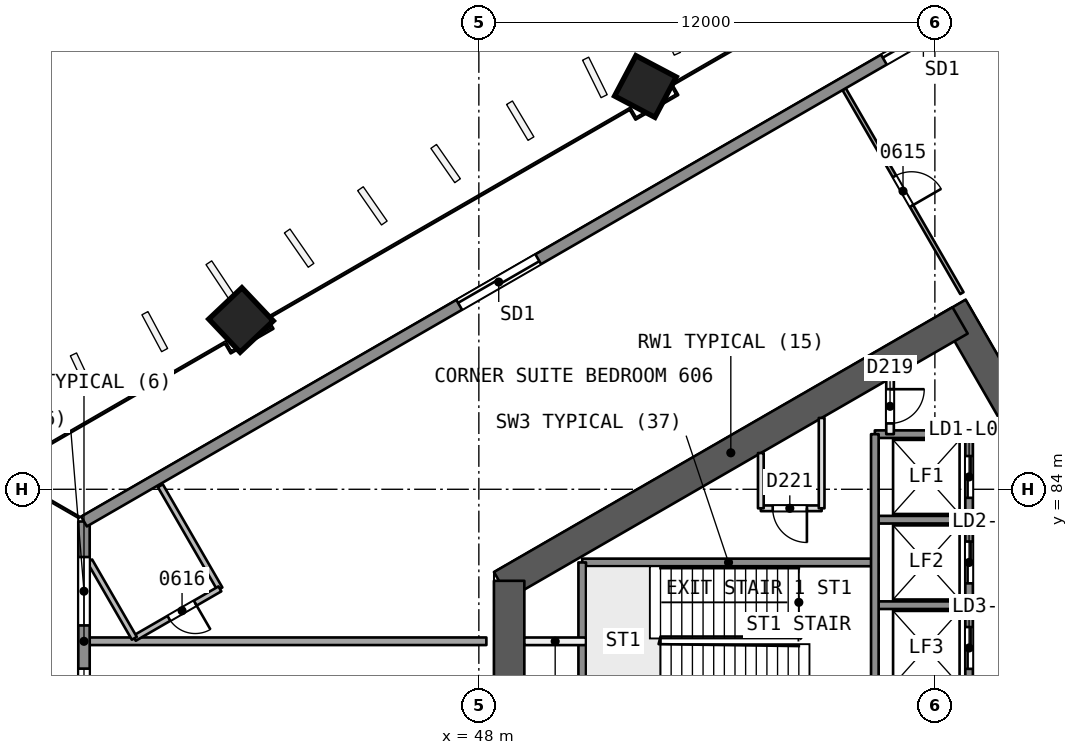
"""IFC4 building model, lengths in metres.
Left out: names, types, materials, properties, quantities, classifications, styles, units other than length and angle.
Written with IfcOpenShell. Run it as: python <this file> out.ifc"""

import sys

from ifc_helpers import new_model, si_unit, direction, frame, frame_2d, origin, origin_2d, place, context, subcontext, project, spatial, rectangle, extrude, element, fill, save


model = new_model("IFC4")
c1 = context("Model", 3, precision=1e-05, world=origin(), true_north=direction((0.0, 1.0)))
c2 = subcontext(c1, "Body", "Model", "MODEL_VIEW")
j1 = project(units=[si_unit("LENGTHUNIT", "METRE"), si_unit("PLANEANGLEUNIT", "RADIAN")], contexts=[c1])
p1 = place(None, origin())
s1 = spatial("IfcSite", under=j1, at=p1, CompositionType="ELEMENT")
p2 = place(p1, origin())
s2 = spatial("IfcBuilding", under=s1, at=p2, CompositionType="ELEMENT")
p3 = place(p2, frame((0.0, 0.0, 33.7)))
s3 = spatial("IfcBuildingStorey", under=s2, at=p3, CompositionType="ELEMENT", Elevation=33.7)
p4 = place(p3, frame((65.538, 80.0, 0.0), z_axis=(0.0, 0.0, 1.0), x_axis=(-0.49999662545, 0.866027352073, 0.0)))
e1 = element("IfcWall", 1, at=p4, inside=s3, PredefinedType="SHEAR", context=c2, shape_type="SweptSolid", body=[
    extrude(rectangle(XDim=10.149, YDim=0.8, at=frame_2d((5.074, 0.0))), origin(), (0.0, 0.0, 1.0), 3.7),
])
p5 = place(p4, frame((0.719, 0.0, 0.0)))
e2 = element("IfcOpeningElement", 2, at=p5, cuts=e1, PredefinedType="OPENING", context=c2, shape_type="SweptSolid", body=[
    extrude(rectangle(XDim=1.2, YDim=2.1, at=frame_2d((0.6, 1.05))), frame((0.0, 0.411, 0.0), z_axis=(0.0, -1.0, 0.0), x_axis=(1.0, 0.0, 0.0)), (0.0, 0.0, 1.0), 0.821),
])
p6 = place(p3, frame((60.664, 88.443, 0.0), z_axis=(0.0, 0.0, 1.0), x_axis=(-0.866029478545, -0.499992942241, 0.0)))
e3 = element("IfcWall", 3, at=p6, inside=s3, PredefinedType="SHEAR", context=c2, shape_type="SweptSolid", body=[
    extrude(rectangle(XDim=13.933, YDim=0.8, at=frame_2d((6.967, 0.0))), origin(), (0.0, 0.0, 1.0), 3.7),
])
p7 = place(p3, frame((48.797, 81.592, 0.0), z_axis=(0.0, 0.0, 1.0), x_axis=(0.0, -1.0, 0.0)))
e4 = element("IfcWall", 4, at=p7, inside=s3, PredefinedType="SHEAR", context=c2, shape_type="SweptSolid", body=[
    extrude(rectangle(XDim=3.415, YDim=0.8, at=frame_2d((1.707, 0.0))), origin(), (0.0, 0.0, 1.0), 3.7),
])
p8 = place(p3, frame((60.664, 71.557, 0.0), z_axis=(0.0, 0.0, 1.0), x_axis=(0.50000409368, 0.866023040284, 0.0)))
e5 = element("IfcWall", 5, at=p8, inside=s3, PredefinedType="SHEAR", context=c2, shape_type="SweptSolid", body=[
    extrude(rectangle(XDim=9.98, YDim=0.8, at=frame_2d((4.99, 0.0))), origin(), (0.0, 0.0, 1.0), 3.7),
])
p9 = place(p8, frame((7.83, 0.0, 0.0)))
e6 = element("IfcOpeningElement", 6, at=p9, cuts=e5, PredefinedType="OPENING", context=c2, shape_type="SweptSolid", body=[
    extrude(rectangle(XDim=1.2, YDim=2.1, at=frame_2d((0.6, 1.05))), frame((0.0, 0.411, 0.0), z_axis=(0.0, -1.0, 0.0), x_axis=(1.0, 0.0, 0.0)), (0.0, 0.0, 1.0), 0.821),
])
p10 = place(p3, frame((52.36, 94.613, 0.0), z_axis=(0.019328501455, -0.012204002625, 0.999738701537), x_axis=(-0.498096589224, 0.866885952098, 0.020212220507)))
e7 = element("IfcColumn", 7, at=p10, inside=s3, PredefinedType="COLUMN", context=c2, shape_type="SweptSolid", body=[
    extrude(rectangle(XDim=1.2, YDim=1.2, at=origin_2d()), origin(), (0.0, 0.0, 1.0), 3.701),
])
p11 = place(p3, frame((41.707, 88.463, 0.0), z_axis=(0.02855911485, -0.006793507689, 0.999569019734), x_axis=(-0.500407643461, 0.865554709988, 0.020180049142)))
e8 = element("IfcColumn", 8, at=p11, inside=s3, PredefinedType="COLUMN", context=c2, shape_type="SweptSolid", body=[
    extrude(rectangle(XDim=1.2, YDim=1.2, at=origin_2d()), origin(), (0.0, 0.0, 1.0), 3.702),
])
p12 = place(p3, frame((57.612, 94.529, 0.0), z_axis=(0.0, 0.0, 1.0), x_axis=(0.499986163319, -0.866033392248, 0.0)))
e9 = element("IfcWall", 9, at=p12, inside=s3, PredefinedType="PARTITIONING", context=c2, shape_type="SweptSolid", body=[
    extrude(rectangle(XDim=6.198, YDim=0.1, at=frame_2d((3.099, 0.0))), origin(), (0.0, 0.0, 1.0), 3.2),
])
p13 = place(p12, frame((2.649, 0.0, 0.0)))
e10 = element("IfcOpeningElement", 10, at=p13, cuts=e9, PredefinedType="OPENING", context=c2, shape_type="SweptSolid", body=[
    extrude(rectangle(XDim=0.9, YDim=2.1, at=frame_2d((0.45, 1.05))), frame((0.0, 0.061, 0.0), z_axis=(0.0, -1.0, 0.0), x_axis=(1.0, 0.0, 0.0)), (0.0, 0.0, 1.0), 0.121),
])
p14 = place(p3, frame((39.619, 84.093, 0.0), z_axis=(0.0, 0.0, 1.0), x_axis=(0.499951757484, -0.866053254822, 0.0)))
e11 = element("IfcWall", 11, at=p14, inside=s3, PredefinedType="PARTITIONING", context=c2, shape_type="SweptSolid", body=[
    extrude(rectangle(XDim=3.134, YDim=0.15, at=frame_2d((1.567, 0.0))), origin(), (0.0, 0.0, 1.0), 3.2),
])
p15 = place(p3, frame((41.186, 81.379, 0.0), z_axis=(0.0, 0.0, 1.0), x_axis=(-0.865997922154, -0.500047596559, 0.0)))
e12 = element("IfcWall", 12, at=p15, inside=s3, PredefinedType="PARTITIONING", context=c2, shape_type="SweptSolid", body=[
    extrude(rectangle(XDim=2.6, YDim=0.15, at=frame_2d((1.3, 0.0))), origin(), (0.0, 0.0, 1.0), 3.2),
])
p16 = place(p15, frame((0.75, 0.0, 0.0)))
e13 = element("IfcOpeningElement", 13, at=p16, cuts=e12, PredefinedType="OPENING", context=c2, shape_type="SweptSolid", body=[
    extrude(rectangle(XDim=0.8, YDim=2.1, at=frame_2d((0.4, 1.05))), frame((0.0, 0.085, 0.0), z_axis=(0.0, -1.0, 0.0), x_axis=(1.0, 0.0, 0.0)), (0.0, 0.0, 1.0), 0.171),
])
p17 = place(p3, frame((38.934, 80.079, 0.0), z_axis=(0.0, 0.0, 1.0), x_axis=(-0.500025027364, 0.866010953747, 0.0)))
e14 = element("IfcWall", 14, at=p17, inside=s3, PredefinedType="PARTITIONING", context=c2, shape_type="SweptSolid", body=[
    extrude(rectangle(XDim=2.352, YDim=0.15, at=frame_2d((1.176, 0.0))), origin(), (0.0, 0.0, 1.0), 3.2),
])
p18 = place(p3, frame((37.759, 80.001, 0.0), z_axis=(0.0, 0.0, 1.0), x_axis=(1.0, 0.0, 0.0)))
e15 = element("IfcWall", 15, at=p18, inside=s3, PredefinedType="PARTITIONING", context=c2, shape_type="SweptSolid", body=[
    extrude(rectangle(XDim=10.439, YDim=0.2, at=frame_2d((5.22, 0.0))), origin(), (0.0, 0.0, 1.0), 3.2),
])
p19 = place(p3, frame((37.61, 76.848, 0.0), z_axis=(0.0, 0.0, 1.0), x_axis=(0.0, 1.0, 0.0)))
e16 = element("IfcWall", 16, at=p19, inside=s3, PredefinedType="SOLIDWALL", context=c2, shape_type="SweptSolid", body=[
    extrude(rectangle(XDim=6.305, YDim=0.3, at=frame_2d((3.152, 0.0))), origin(), (0.0, 0.0, 1.0), 3.2),
])
p20 = place(p19, frame((3.57, 0.0, 0.9)))
e17 = element("IfcOpeningElement", 17, at=p20, cuts=e16, PredefinedType="OPENING", context=c2, shape_type="SweptSolid", body=[
    extrude(rectangle(XDim=1.8, YDim=1.5, at=frame_2d((0.9, 0.75))), frame((0.0, 0.161, 0.0), z_axis=(0.0, -1.0, 0.0), x_axis=(1.0, 0.0, 0.0)), (0.0, 0.0, 1.0), 0.321),
])
p21 = place(p19, frame((0.633, 0.0, 0.9)))
e18 = element("IfcOpeningElement", 18, at=p21, cuts=e16, PredefinedType="OPENING", context=c2, shape_type="SweptSolid", body=[
    extrude(rectangle(XDim=1.8, YDim=1.5, at=frame_2d((0.9, 0.75))), frame((0.0, 0.161, 0.0), z_axis=(0.0, -1.0, 0.0), x_axis=(1.0, 0.0, 0.0)), (0.0, 0.0, 1.0), 0.321),
])
p22 = place(p3, frame((37.61, 83.152, 0.0), z_axis=(0.0, 0.0, 1.0), x_axis=(0.866024438126, 0.500001672566, 0.0)))
e19 = element("IfcWall", 19, at=p22, inside=s3, PredefinedType="SOLIDWALL", context=c2, shape_type="SweptSolid", body=[
    extrude(rectangle(XDim=61.61, YDim=0.3, at=frame_2d((30.805, 0.0))), origin(), (0.0, 0.0, 1.0), 3.2),
])
p23 = place(p22, frame((34.281, 0.0, 0.0)))
e20 = element("IfcOpeningElement", 20, at=p23, cuts=e19, PredefinedType="OPENING", context=c2, shape_type="SweptSolid", body=[
    extrude(rectangle(XDim=2.4, YDim=2.4, at=frame_2d((1.2, 1.2))), frame((0.0, 0.161, 0.0), z_axis=(0.0, -1.0, 0.0), x_axis=(1.0, 0.0, 0.0)), (0.0, 0.0, 1.0), 0.321),
])
p24 = place(p22, frame((47.767, 0.0, 0.0)))
e21 = element("IfcOpeningElement", 21, at=p24, cuts=e19, PredefinedType="OPENING", context=c2, shape_type="SweptSolid", body=[
    extrude(rectangle(XDim=2.4, YDim=2.4, at=frame_2d((1.2, 1.2))), frame((0.0, 0.161, 0.0), z_axis=(0.0, -1.0, 0.0), x_axis=(1.0, 0.0, 0.0)), (0.0, 0.0, 1.0), 0.321),
])
p25 = place(p22, frame((24.305, 0.0, 0.0)))
e22 = element("IfcOpeningElement", 22, at=p25, cuts=e19, PredefinedType="OPENING", context=c2, shape_type="SweptSolid", body=[
    extrude(rectangle(XDim=2.4, YDim=2.4, at=frame_2d((1.2, 1.2))), frame((0.0, 0.161, 0.0), z_axis=(0.0, -1.0, 0.0), x_axis=(1.0, 0.0, 0.0)), (0.0, 0.0, 1.0), 0.321),
])
p26 = place(p22, frame((11.402, 0.0, 0.0)))
e23 = element("IfcOpeningElement", 23, at=p26, cuts=e19, PredefinedType="OPENING", context=c2, shape_type="SweptSolid", body=[
    extrude(rectangle(XDim=2.4, YDim=2.4, at=frame_2d((1.2, 1.2))), frame((0.0, 0.161, 0.0), z_axis=(0.0, -1.0, 0.0), x_axis=(1.0, 0.0, 0.0)), (0.0, 0.0, 1.0), 0.321),
])
p27 = place(p22, frame((28.981, 0.0, 0.0)))
e24 = element("IfcOpeningElement", 24, at=p27, cuts=e19, PredefinedType="OPENING", context=c2, shape_type="SweptSolid", body=[
    extrude(rectangle(XDim=2.4, YDim=2.4, at=frame_2d((1.2, 1.2))), frame((0.0, 0.161, 0.0), z_axis=(0.0, -1.0, 0.0), x_axis=(1.0, 0.0, 0.0)), (0.0, 0.0, 1.0), 0.321),
])
p28 = place(p3, frame((60.9, 85.45, 0.0), z_axis=(0.0, 0.0, 1.0), x_axis=(-1.0, 0.0, 0.0)))
e25 = element("IfcWall", 25, at=p28, inside=s3, PredefinedType="SOLIDWALL", context=c2, shape_type="SweptSolid", body=[
    extrude(rectangle(XDim=2.48, YDim=0.2, at=frame_2d((1.24, 0.0))), origin(), (0.0, 0.0, 1.0), 3.2),
])
p29 = place(p3, frame((57.02, 83.5, 0.0), z_axis=(0.0, 0.0, 1.0), x_axis=(-1.0, 0.0, 0.0)))
e26 = element("IfcWall", 26, at=p29, inside=s3, PredefinedType="PARTITIONING", context=c2, shape_type="SweptSolid", body=[
    extrude(rectangle(XDim=1.6, YDim=0.15, at=frame_2d((0.8, 0.0))), origin(), (0.0, 0.0, 1.0), 3.2),
])
p30 = place(p29, frame((0.387, 0.0, 0.0)))
e27 = element("IfcOpeningElement", 27, at=p30, cuts=e26, PredefinedType="OPENING", context=c2, shape_type="SweptSolid", body=[
    extrude(rectangle(XDim=0.9, YDim=2.1, at=frame_2d((0.45, 1.05))), frame((0.0, 0.085, 0.0), z_axis=(0.0, -1.0, 0.0), x_axis=(1.0, 0.0, 0.0)), (0.0, 0.0, 1.0), 0.171),
])
p31 = place(p3, frame((60.9, 83.2, 0.0), z_axis=(0.0, 0.0, 1.0), x_axis=(-1.0, 0.0, 0.0)))
e28 = element("IfcWall", 28, at=p31, inside=s3, PredefinedType="SOLIDWALL", context=c2, shape_type="SweptSolid", body=[
    extrude(rectangle(XDim=2.48, YDim=0.2, at=frame_2d((1.24, 0.0))), origin(), (0.0, 0.0, 1.0), 3.2),
])
p32 = place(p3, frame((58.42, 82.075, 0.0), z_axis=(0.0, 0.0, 1.0), x_axis=(-1.0, 0.0, 0.0)))
e29 = element("IfcWall", 29, at=p32, inside=s3, PredefinedType="SOLIDWALL", context=c2, shape_type="SweptSolid", body=[
    extrude(rectangle(XDim=7.7, YDim=0.2, at=frame_2d((3.85, 0.0))), origin(), (0.0, 0.0, 1.0), 3.2),
])
p33 = place(p3, frame((60.9, 80.95, 0.0), z_axis=(0.0, 0.0, 1.0), x_axis=(-1.0, 0.0, 0.0)))
e30 = element("IfcWall", 30, at=p33, inside=s3, PredefinedType="SOLIDWALL", context=c2, shape_type="SweptSolid", body=[
    extrude(rectangle(XDim=2.48, YDim=0.2, at=frame_2d((1.24, 0.0))), origin(), (0.0, 0.0, 1.0), 3.2),
])
p34 = place(p3, frame((50.82, 80.0, 0.0), z_axis=(0.0, 0.0, 1.0), x_axis=(-1.0, 0.0, 0.0)))
e31 = element("IfcWall", 31, at=p34, inside=s3, PredefinedType="PARTITIONING", context=c2, shape_type="SweptSolid", body=[
    extrude(rectangle(XDim=1.623, YDim=0.2, at=frame_2d((0.812, 0.0))), origin(), (0.0, 0.0, 1.0), 3.2),
])
p35 = place(p3, frame((60.9, 85.45, 0.0), z_axis=(0.0, 0.0, 1.0), x_axis=(0.0, -1.0, 0.0)))
e32 = element("IfcWall", 32, at=p35, inside=s3, PredefinedType="SOLIDWALL", context=c2, shape_type="SweptSolid", body=[
    extrude(rectangle(XDim=10.9, YDim=0.2, at=frame_2d((5.45, 0.0))), origin(), (0.0, 0.0, 1.0), 3.2),
])
p36 = place(p35, frame((0.575, 0.0, 0.0)))
e33 = element("IfcOpeningElement", 33, at=p36, cuts=e32, PredefinedType="OPENING", context=c2, shape_type="SweptSolid", body=[
    extrude(rectangle(XDim=1.1, YDim=2.1, at=frame_2d((0.55, 1.05))), frame((0.0, 0.11, 0.0), z_axis=(0.0, -1.0, 0.0), x_axis=(1.0, 0.0, 0.0)), (0.0, 0.0, 1.0), 0.221),
])
p37 = place(p35, frame((2.825, 0.0, 0.0)))
e34 = element("IfcOpeningElement", 34, at=p37, cuts=e32, PredefinedType="OPENING", context=c2, shape_type="SweptSolid", body=[
    extrude(rectangle(XDim=1.1, YDim=2.1, at=frame_2d((0.55, 1.05))), frame((0.0, 0.11, 0.0), z_axis=(0.0, -1.0, 0.0), x_axis=(1.0, 0.0, 0.0)), (0.0, 0.0, 1.0), 0.221),
])
p38 = place(p35, frame((5.075, 0.0, 0.0)))
e35 = element("IfcOpeningElement", 35, at=p38, cuts=e32, PredefinedType="OPENING", context=c2, shape_type="SweptSolid", body=[
    extrude(rectangle(XDim=1.1, YDim=2.1, at=frame_2d((0.55, 1.05))), frame((0.0, 0.11, 0.0), z_axis=(0.0, -1.0, 0.0), x_axis=(1.0, 0.0, 0.0)), (0.0, 0.0, 1.0), 0.221),
])
p39 = place(p35, frame((7.325, 0.0, 0.0)))
e36 = element("IfcOpeningElement", 36, at=p39, cuts=e32, PredefinedType="OPENING", context=c2, shape_type="SweptSolid", body=[
    extrude(rectangle(XDim=1.1, YDim=2.1, at=frame_2d((0.55, 1.05))), frame((0.0, 0.11, 0.0), z_axis=(0.0, -1.0, 0.0), x_axis=(1.0, 0.0, 0.0)), (0.0, 0.0, 1.0), 0.221),
])
p40 = place(p3, frame((58.82, 86.917, 0.0), z_axis=(0.0, 0.0, 1.0), x_axis=(0.0, -1.0, 0.0)))
e37 = element("IfcWall", 37, at=p40, inside=s3, PredefinedType="PARTITIONING", context=c2, shape_type="SweptSolid", body=[
    extrude(rectangle(XDim=1.467, YDim=0.2, at=frame_2d((0.733, 0.0))), origin(), (0.0, 0.0, 1.0), 3.2),
])
p41 = place(p40, frame((0.283, 0.0, 0.0)))
e38 = element("IfcOpeningElement", 38, at=p41, cuts=e37, PredefinedType="OPENING", context=c2, shape_type="SweptSolid", body=[
    extrude(rectangle(XDim=0.9, YDim=2.1, at=frame_2d((0.45, 1.05))), frame((0.0, 0.11, 0.0), z_axis=(0.0, -1.0, 0.0), x_axis=(1.0, 0.0, 0.0)), (0.0, 0.0, 1.0), 0.221),
])
p42 = place(p3, frame((58.42, 85.45, 0.0), z_axis=(0.0, 0.0, 1.0), x_axis=(0.0, -1.0, 0.0)))
e39 = element("IfcWall", 39, at=p42, inside=s3, PredefinedType="SOLIDWALL", context=c2, shape_type="SweptSolid", body=[
    extrude(rectangle(XDim=9.0, YDim=0.2, at=frame_2d((4.5, 0.0))), origin(), (0.0, 0.0, 1.0), 3.2),
])
p43 = place(p3, frame((57.02, 85.877, 0.0), z_axis=(0.0, 0.0, 1.0), x_axis=(0.0, -1.0, 0.0)))
e40 = element("IfcWall", 40, at=p43, inside=s3, PredefinedType="PARTITIONING", context=c2, shape_type="SweptSolid", body=[
    extrude(rectangle(XDim=2.377, YDim=0.15, at=frame_2d((1.189, 0.0))), origin(), (0.0, 0.0, 1.0), 3.2),
])
p44 = place(p3, frame((55.42, 84.954, 0.0), z_axis=(0.0, 0.0, 1.0), x_axis=(0.0, -1.0, 0.0)))
e41 = element("IfcWall", 41, at=p44, inside=s3, PredefinedType="PARTITIONING", context=c2, shape_type="SweptSolid", body=[
    extrude(rectangle(XDim=1.454, YDim=0.15, at=frame_2d((0.727, 0.0))), origin(), (0.0, 0.0, 1.0), 3.2),
])
p45 = place(p3, frame((50.72, 82.075, 0.0), z_axis=(0.0, 0.0, 1.0), x_axis=(0.0, -1.0, 0.0)))
e42 = element("IfcWall", 42, at=p45, inside=s3, PredefinedType="SOLIDWALL", context=c2, shape_type="SweptSolid", body=[
    extrude(rectangle(XDim=4.15, YDim=0.2, at=frame_2d((2.075, 0.0))), origin(), (0.0, 0.0, 1.0), 3.2),
])
p46 = place(p13, origin())
e43 = element("IfcDoor", 43, at=p46, inside=s3, OperationType="SINGLE_SWING_RIGHT", PredefinedType="NOTDEFINED", context=c2, shape_type="SweptSolid", body=[
    extrude(rectangle(XDim=0.9, YDim=2.1, at=frame_2d((0.45, 1.05))), frame((0.0, 0.025, 0.0), z_axis=(0.0, -1.0, 0.0), x_axis=(1.0, 0.0, 0.0)), (0.0, 0.0, 1.0), 0.05),
])
fill(e10, e43)
p47 = place(p16, origin())
e44 = element("IfcDoor", 44, at=p47, inside=s3, OperationType="SINGLE_SWING_LEFT", PredefinedType="NOTDEFINED", context=c2, shape_type="SweptSolid", body=[
    extrude(rectangle(XDim=0.8, YDim=2.1, at=frame_2d((0.4, 1.05))), frame((0.0, 0.025, 0.0), z_axis=(0.0, -1.0, 0.0), x_axis=(1.0, 0.0, 0.0)), (0.0, 0.0, 1.0), 0.05),
])
fill(e13, e44)
p48 = place(p20, origin())
e45 = element("IfcWindow", 45, at=p48, inside=s3, PartitioningType="SINGLE_PANEL", PredefinedType="WINDOW", context=c2, shape_type="SweptSolid", body=[
    extrude(rectangle(XDim=1.8, YDim=1.5, at=frame_2d((0.9, 0.75))), frame((0.0, 0.03, 0.0), z_axis=(0.0, -1.0, 0.0), x_axis=(1.0, 0.0, 0.0)), (0.0, 0.0, 1.0), 0.06),
])
fill(e17, e45)
p49 = place(p21, origin())
e46 = element("IfcWindow", 46, at=p49, inside=s3, PartitioningType="SINGLE_PANEL", PredefinedType="WINDOW", context=c2, shape_type="SweptSolid", body=[
    extrude(rectangle(XDim=1.8, YDim=1.5, at=frame_2d((0.9, 0.75))), frame((0.0, 0.03, 0.0), z_axis=(0.0, -1.0, 0.0), x_axis=(1.0, 0.0, 0.0)), (0.0, 0.0, 1.0), 0.06),
])
fill(e18, e46)
p50 = place(p25, origin())
e47 = element("IfcDoor", 47, at=p50, inside=s3, OperationType="SLIDING_TO_LEFT", PredefinedType="NOTDEFINED", context=c2, shape_type="SweptSolid", body=[
    extrude(rectangle(XDim=2.4, YDim=2.4, at=frame_2d((1.2, 1.2))), frame((0.0, 0.025, 0.0), z_axis=(0.0, -1.0, 0.0), x_axis=(1.0, 0.0, 0.0)), (0.0, 0.0, 1.0), 0.05),
])
fill(e22, e47)
p51 = place(p26, origin())
e48 = element("IfcDoor", 48, at=p51, inside=s3, OperationType="SLIDING_TO_RIGHT", PredefinedType="NOTDEFINED", context=c2, shape_type="SweptSolid", body=[
    extrude(rectangle(XDim=2.4, YDim=2.4, at=frame_2d((1.2, 1.2))), frame((0.0, 0.025, 0.0), z_axis=(0.0, -1.0, 0.0), x_axis=(1.0, 0.0, 0.0)), (0.0, 0.0, 1.0), 0.05),
])
fill(e23, e48)
p52 = place(p36, origin())
e49 = element("IfcDoor", 49, at=p52, inside=s3, OperationType="SLIDING_TO_RIGHT", PredefinedType="NOTDEFINED", context=c2, shape_type="SweptSolid", body=[
    extrude(rectangle(XDim=1.1, YDim=2.1, at=frame_2d((0.55, 1.05))), frame((0.0, 0.025, 0.0), z_axis=(0.0, -1.0, 0.0), x_axis=(1.0, 0.0, 0.0)), (0.0, 0.0, 1.0), 0.05),
])
fill(e33, e49)
p53 = place(p37, origin())
e50 = element("IfcDoor", 50, at=p53, inside=s3, OperationType="SLIDING_TO_LEFT", PredefinedType="NOTDEFINED", context=c2, shape_type="SweptSolid", body=[
    extrude(rectangle(XDim=1.1, YDim=2.1, at=frame_2d((0.55, 1.05))), frame((0.0, 0.025, 0.0), z_axis=(0.0, -1.0, 0.0), x_axis=(1.0, 0.0, 0.0)), (0.0, 0.0, 1.0), 0.05),
])
fill(e34, e50)
p54 = place(p38, origin())
e51 = element("IfcDoor", 51, at=p54, inside=s3, OperationType="SLIDING_TO_RIGHT", PredefinedType="NOTDEFINED", context=c2, shape_type="SweptSolid", body=[
    extrude(rectangle(XDim=1.1, YDim=2.1, at=frame_2d((0.55, 1.05))), frame((0.0, 0.025, 0.0), z_axis=(0.0, -1.0, 0.0), x_axis=(1.0, 0.0, 0.0)), (0.0, 0.0, 1.0), 0.05),
])
fill(e35, e51)
p55 = place(p41, origin())
e52 = element("IfcDoor", 52, at=p55, inside=s3, OperationType="SINGLE_SWING_LEFT", PredefinedType="NOTDEFINED", context=c2, shape_type="SweptSolid", body=[
    extrude(rectangle(XDim=0.9, YDim=2.1, at=frame_2d((0.45, 1.05))), frame((0.0, 0.025, 0.0), z_axis=(0.0, -1.0, 0.0), x_axis=(1.0, 0.0, 0.0)), (0.0, 0.0, 1.0), 0.05),
])
fill(e38, e52)
p56 = place(p30, origin())
e53 = element("IfcDoor", 53, at=p56, inside=s3, OperationType="SINGLE_SWING_LEFT", PredefinedType="NOTDEFINED", context=c2, shape_type="SweptSolid", body=[
    extrude(rectangle(XDim=0.9, YDim=2.1, at=frame_2d((0.45, 1.05))), frame((0.0, 0.025, 0.0), z_axis=(0.0, -1.0, 0.0), x_axis=(1.0, 0.0, 0.0)), (0.0, 0.0, 1.0), 0.05),
])
fill(e27, e53)
save(model, sys.argv[1])
